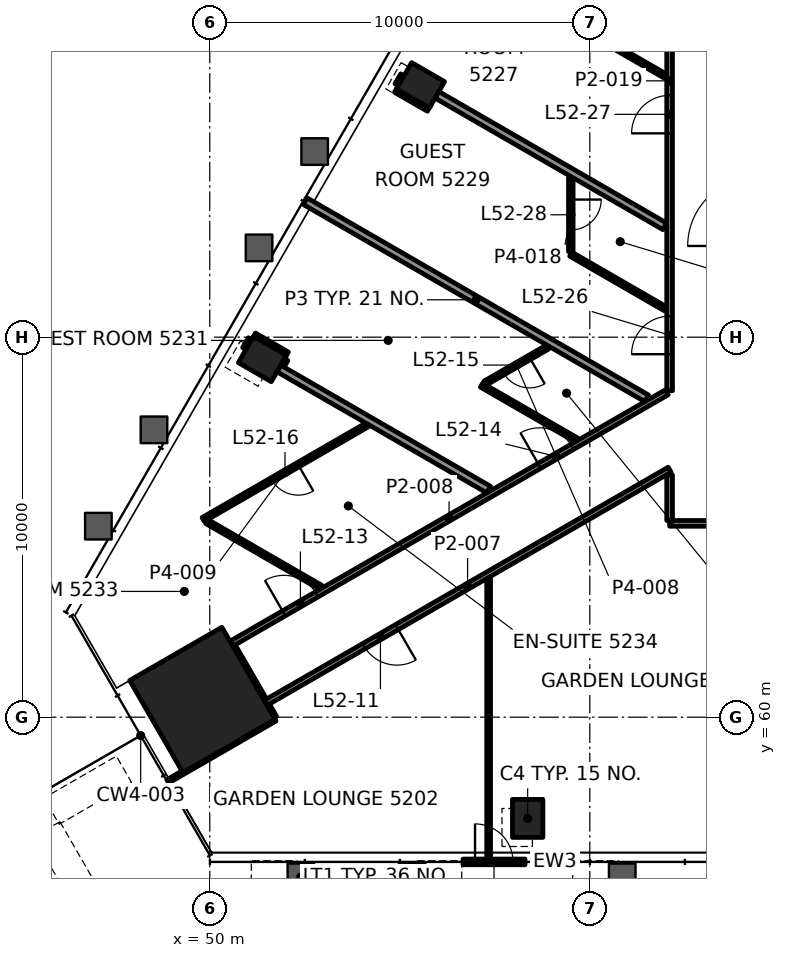
"""IFC4 building model, lengths in metres.
Left out: names, types, materials, properties, quantities, classifications, styles, units other than length and angle.
Written with IfcOpenShell. Run it as: python <this file> out.ifc"""

import sys

from ifc_helpers import new_model, si_unit, direction, frame, frame_2d, origin, origin_2d, place, context, subcontext, project, spatial, rectangle, hollow_rectangle, extrude, element, fill, save


model = new_model("IFC4")
c1 = context("Model", 3, precision=1e-05, world=origin(), true_north=direction((0.0, 1.0)))
c2 = subcontext(c1, "Body", "Model", "MODEL_VIEW")
j1 = project(units=[si_unit("LENGTHUNIT", "METRE"), si_unit("PLANEANGLEUNIT", "RADIAN")], contexts=[c1])
p1 = place(None, origin())
s1 = spatial("IfcSite", under=j1, at=p1, CompositionType="ELEMENT")
p2 = place(p1, origin())
s2 = spatial("IfcBuilding", under=s1, at=p2, CompositionType="ELEMENT")
p3 = place(p2, frame((0.0, 0.0, 222.1)))
s3 = spatial("IfcBuildingStorey", under=s2, at=p3, CompositionType="ELEMENT", Elevation=222.1)
p4 = place(p3, frame((49.806, 60.454, 0.0), z_axis=(0.0, 0.0, 1.0), x_axis=(0.5, -0.866025403784, 0.0)))
e1 = element("IfcColumn", 1, at=p4, inside=s3, PredefinedType="COLUMN", context=c2, shape_type="SweptSolid", body=[
    extrude(rectangle(XDim=2.8, YDim=2.8, at=origin_2d()), origin(), (0.0, 0.0, 1.0), 3.9),
])
for number, where, z_axis, x_axis in (
    (2, (58.365, 57.337, -0.0), (0.0, 0.0, 1.0), (1.0, 0.0, 0.0)),
    (3, (55.544, 76.628, -0.0), (0.0, 0.0, 1.0), (-0.5, -0.866, 0.0)),
    (4, (51.385, 69.425, -0.0), (0.0, 0.0, 1.0), (-0.5, -0.866, 0.0)),
):
    element("IfcColumn", number, at=place(p3, frame(where, z_axis=z_axis, x_axis=x_axis)), inside=s3, PredefinedType="COLUMN", context=c2, shape_type="SweptSolid", body=[
        extrude(hollow_rectangle(XDim=0.8, YDim=1.0, WallThickness=0.05, at=origin_2d()), origin(), (0.0, 0.0, 1.0), 3.9),
    ])
p5 = place(p3, frame((87.899, 65.1, 0.0), z_axis=(0.0, 0.0, 1.0), x_axis=(-1.0, 0.0, 0.0)))
e5 = element("IfcWall", 5, at=p5, inside=s3, PredefinedType="PARTITIONING", context=c2, shape_type="SweptSolid", body=[
    extrude(rectangle(XDim=25.799, YDim=0.15, at=frame_2d((12.899, 0.0))), origin(), (0.0, 0.0, 1.0), 3.1),
])
p6 = place(p5, frame((1.636, 0.0, 0.0)))
e6 = element("IfcOpeningElement", 6, at=p6, cuts=e5, PredefinedType="OPENING", context=c2, shape_type="SweptSolid", body=[
    extrude(rectangle(XDim=1.0, YDim=2.1, at=frame_2d((0.5, 1.05))), frame((0.0, 0.085, 0.0), z_axis=(0.0, -1.0, 0.0), x_axis=(1.0, 0.0, 0.0)), (0.0, 0.0, 1.0), 0.17),
])
p7 = place(p5, frame((7.984, 0.0, 0.0)))
e7 = element("IfcOpeningElement", 7, at=p7, cuts=e5, PredefinedType="OPENING", context=c2, shape_type="SweptSolid", body=[
    extrude(rectangle(XDim=1.0, YDim=2.1, at=frame_2d((0.5, 1.05))), frame((0.0, 0.085, 0.0), z_axis=(0.0, -1.0, 0.0), x_axis=(1.0, 0.0, 0.0)), (0.0, 0.0, 1.0), 0.17),
])
p8 = place(p5, frame((16.815, 0.0, 0.0)))
e8 = element("IfcOpeningElement", 8, at=p8, cuts=e5, PredefinedType="OPENING", context=c2, shape_type="SweptSolid", body=[
    extrude(rectangle(XDim=1.0, YDim=2.1, at=frame_2d((0.5, 1.05))), frame((0.0, 0.085, 0.0), z_axis=(0.0, -1.0, 0.0), x_axis=(1.0, 0.0, 0.0)), (0.0, 0.0, 1.0), 0.17),
])
p9 = place(p5, frame((23.163, 0.0, 0.0)))
e9 = element("IfcOpeningElement", 9, at=p9, cuts=e5, PredefinedType="OPENING", context=c2, shape_type="SweptSolid", body=[
    extrude(rectangle(XDim=1.0, YDim=2.1, at=frame_2d((0.5, 1.05))), frame((0.0, 0.085, 0.0), z_axis=(0.0, -1.0, 0.0), x_axis=(1.0, 0.0, 0.0)), (0.0, 0.0, 1.0), 0.17),
])
p10 = place(p3, frame((48.895, 58.312, 0.0), z_axis=(0.0, 0.0, 1.0), x_axis=(0.866035906198, 0.499981808845, 0.0)))
e10 = element("IfcWall", 10, at=p10, inside=s3, PredefinedType="PARTITIONING", context=c2, shape_type="SweptSolid", body=[
    extrude(rectangle(XDim=3.259, YDim=0.1, at=frame_2d((1.63, 0.0))), origin(), (0.0, 0.0, 1.0), 3.1),
])
p11 = place(p3, frame((62.1, 66.513, 0.0), z_axis=(0.0, 0.0, 1.0), x_axis=(-0.866027942666, -0.499995602502, 0.0)))
e11 = element("IfcWall", 11, at=p11, inside=s3, PredefinedType="PARTITIONING", context=c2, shape_type="SweptSolid", body=[
    extrude(rectangle(XDim=12.276, YDim=0.15, at=frame_2d((6.138, 0.0))), origin(), (0.0, 0.0, 1.0), 2.947),
])
p12 = place(p11, frame((8.286, 0.0, 0.0)))
e12 = element("IfcOpeningElement", 12, at=p12, cuts=e11, PredefinedType="OPENING", context=c2, shape_type="SweptSolid", body=[
    extrude(rectangle(XDim=1.0, YDim=2.1, at=frame_2d((0.5, 1.05))), frame((0.0, 0.085, 0.0), z_axis=(0.0, -1.0, 0.0), x_axis=(1.0, 0.0, 0.0)), (0.0, 0.0, 1.0), 0.17),
])
p13 = place(p3, frame((50.569, 61.934, 0.0), z_axis=(0.0, 0.0, 1.0), x_axis=(0.866030071145, 0.499991915808, 0.0)))
e13 = element("IfcWall", 13, at=p13, inside=s3, PredefinedType="PARTITIONING", context=c2, shape_type="SweptSolid", body=[
    extrude(rectangle(XDim=13.228, YDim=0.15, at=frame_2d((6.614, 0.0))), origin(), (0.0, 0.0, 1.0), 3.1),
])
p14 = place(p13, frame((1.597, 0.0, 0.0)))
e14 = element("IfcOpeningElement", 14, at=p14, cuts=e13, PredefinedType="OPENING", context=c2, shape_type="SweptSolid", body=[
    extrude(rectangle(XDim=1.0, YDim=2.1, at=frame_2d((0.5, 1.05))), frame((0.0, 0.085, 0.0), z_axis=(0.0, -1.0, 0.0), x_axis=(1.0, 0.0, 0.0)), (0.0, 0.0, 1.0), 0.17),
])
p15 = place(p13, frame((9.36, 0.0, 0.0)))
e15 = element("IfcOpeningElement", 15, at=p15, cuts=e13, PredefinedType="OPENING", context=c2, shape_type="SweptSolid", body=[
    extrude(rectangle(XDim=1.0, YDim=2.1, at=frame_2d((0.5, 1.05))), frame((0.0, 0.085, 0.0), z_axis=(0.0, -1.0, 0.0), x_axis=(1.0, 0.0, 0.0)), (0.0, 0.0, 1.0), 0.17),
])
p16 = place(p3, frame((58.889, 69.74, 0.0), z_axis=(0.0, 0.0, 1.0), x_axis=(-0.866039783157, -0.499975093369, 0.0)))
e16 = element("IfcWall", 16, at=p16, inside=s3, PredefinedType="PARTITIONING", context=c2, shape_type="SweptSolid", body=[
    extrude(rectangle(XDim=1.896, YDim=0.12, at=frame_2d((0.948, 0.0))), origin(), (0.0, 0.0, 1.0), 3.1),
])
p17 = place(p16, frame((0.548, 0.0, 0.0)))
e17 = element("IfcOpeningElement", 17, at=p17, cuts=e16, PredefinedType="OPENING", context=c2, shape_type="SweptSolid", body=[
    extrude(rectangle(XDim=0.8, YDim=2.1, at=frame_2d((0.4, 1.05))), frame((0.0, 0.07, 0.0), z_axis=(0.0, -1.0, 0.0), x_axis=(1.0, 0.0, 0.0)), (0.0, 0.0, 1.0), 0.14),
])
p18 = place(p3, frame((54.13, 67.685, 0.0), z_axis=(0.0, 0.0, 1.0), x_axis=(-0.866020232408, -0.500008956979, 0.0)))
e18 = element("IfcWall", 18, at=p18, inside=s3, PredefinedType="PARTITIONING", context=c2, shape_type="SweptSolid", body=[
    extrude(rectangle(XDim=4.967, YDim=0.12, at=frame_2d((2.483, 0.0))), origin(), (0.0, 0.0, 1.0), 3.1),
])
p19 = place(p18, frame((2.083, 0.0, 0.0)))
e19 = element("IfcOpeningElement", 19, at=p19, cuts=e18, PredefinedType="OPENING", context=c2, shape_type="SweptSolid", body=[
    extrude(rectangle(XDim=0.8, YDim=2.1, at=frame_2d((0.4, 1.05))), frame((0.0, 0.07, 0.0), z_axis=(0.0, -1.0, 0.0), x_axis=(1.0, 0.0, 0.0)), (0.0, 0.0, 1.0), 0.14),
])
p20 = place(p3, frame((51.868, 69.262, 0.0), z_axis=(0.0, 0.0, 1.0), x_axis=(0.500359323436, 0.865817848887, 0.0)))
e20 = element("IfcWall", 20, at=p20, inside=s3, PredefinedType="PARTITIONING", context=c2, shape_type="SweptSolid", body=[
    extrude(rectangle(XDim=0.199, YDim=0.2, at=frame_2d((0.1, 0.0))), origin(), (0.0, 0.0, 1.0), 3.1),
])
p21 = place(p3, frame((50.952, 69.676, 0.0), z_axis=(0.0, 0.0, 1.0), x_axis=(0.500264001326, 0.865872928886, 0.0)))
e21 = element("IfcWall", 21, at=p21, inside=s3, PredefinedType="PARTITIONING", context=c2, shape_type="SweptSolid", body=[
    extrude(rectangle(XDim=0.299, YDim=0.2, at=frame_2d((0.149, 0.0))), origin(), (0.0, 0.0, 1.0), 3.1),
])
p22 = place(p3, frame((54.961, 76.619, 0.0), z_axis=(0.0, 0.0, 1.0), x_axis=(0.500426713919, 0.865778900179, 0.0)))
e22 = element("IfcWall", 22, at=p22, inside=s3, PredefinedType="PARTITIONING", context=c2, shape_type="SweptSolid", body=[
    extrude(rectangle(XDim=0.3, YDim=0.2, at=frame_2d((0.15, 0.0))), origin(), (0.0, 0.0, 1.0), 3.1),
])
p23 = place(p3, frame((62.1, 65.176, 0.0), z_axis=(0.0, 0.0, 1.0), x_axis=(0.0, 1.0, 0.0)))
e23 = element("IfcWall", 23, at=p23, inside=s3, PredefinedType="PARTITIONING", context=c2, shape_type="SweptSolid", body=[
    extrude(rectangle(XDim=1.201, YDim=0.15, at=frame_2d((0.6, 0.0))), origin(), (0.0, 0.0, 1.0), 2.947),
])
p24 = place(p3, frame((62.1, 68.591, 0.0), z_axis=(0.0, 0.0, 1.0), x_axis=(0.0, 1.0, 0.0)))
e24 = element("IfcWall", 24, at=p24, inside=s3, PredefinedType="PARTITIONING", context=c2, shape_type="SweptSolid", body=[
    extrude(rectangle(XDim=16.308, YDim=0.15, at=frame_2d((8.154, 0.0))), origin(), (0.0, 0.0, 1.0), 3.1),
])
p25 = place(p24, frame((0.96, 0.0, 0.0)))
e25 = element("IfcOpeningElement", 25, at=p25, cuts=e24, PredefinedType="OPENING", context=c2, shape_type="SweptSolid", body=[
    extrude(rectangle(XDim=1.0, YDim=2.1, at=frame_2d((0.5, 1.05))), frame((0.0, 0.085, 0.0), z_axis=(0.0, -1.0, 0.0), x_axis=(1.0, 0.0, 0.0)), (0.0, 0.0, 1.0), 0.17),
])
p26 = place(p24, frame((6.772, 0.0, 0.0)))
e26 = element("IfcOpeningElement", 26, at=p26, cuts=e24, PredefinedType="OPENING", context=c2, shape_type="SweptSolid", body=[
    extrude(rectangle(XDim=1.0, YDim=2.1, at=frame_2d((0.5, 1.05))), frame((0.0, 0.085, 0.0), z_axis=(0.0, -1.0, 0.0), x_axis=(1.0, 0.0, 0.0)), (0.0, 0.0, 1.0), 0.17),
])
p27 = place(p3, frame((59.5, 74.189, 0.0), z_axis=(0.0, 0.0, 1.0), x_axis=(0.0, -1.0, 0.0)))
e27 = element("IfcWall", 27, at=p27, inside=s3, PredefinedType="PARTITIONING", context=c2, shape_type="SweptSolid", body=[
    extrude(rectangle(XDim=1.936, YDim=0.12, at=frame_2d((0.968, 0.0))), origin(), (0.0, 0.0, 1.0), 3.1),
])
p28 = place(p27, frame((0.568, 0.0, 0.0)))
e28 = element("IfcOpeningElement", 28, at=p28, cuts=e27, PredefinedType="OPENING", context=c2, shape_type="SweptSolid", body=[
    extrude(rectangle(XDim=0.8, YDim=2.1, at=frame_2d((0.4, 1.05))), frame((0.0, 0.07, 0.0), z_axis=(0.0, -1.0, 0.0), x_axis=(1.0, 0.0, 0.0)), (0.0, 0.0, 1.0), 0.14),
])
p29 = place(p3, frame((57.338, 56.312, 0.0), z_axis=(0.0, 0.0, 1.0), x_axis=(0.0, 1.0, 0.0)))
e29 = element("IfcWall", 29, at=p29, inside=s3, PredefinedType="PARTITIONING", context=c2, shape_type="SweptSolid", body=[
    extrude(rectangle(XDim=7.335, YDim=0.1, at=frame_2d((3.668, 0.0))), origin(), (0.0, 0.0, 1.0), 3.1),
])
p30 = place(p3, frame((51.693, 59.985, 0.0), z_axis=(0.0, 0.0, 1.0), x_axis=(-0.499854089722, 0.866109628736, 0.0)))
e30 = element("IfcWall", 30, at=p30, inside=s3, PredefinedType="PARTITIONING", context=c2, shape_type="SweptSolid", body=[
    extrude(rectangle(XDim=0.375, YDim=0.15, at=frame_2d((0.187, 0.0))), origin(), (0.0, 0.0, 1.0), 3.1),
])
p31 = place(p3, frame((61.99, 76.868, 0.0), z_axis=(0.0, 0.0, 1.0), x_axis=(-0.866028357664, 0.499994883695, 0.0)))
e31 = element("IfcWall", 31, at=p31, inside=s3, PredefinedType="PARTITIONING", context=c2, shape_type="SweptSolid", body=[
    extrude(rectangle(XDim=3.568, YDim=0.12, at=frame_2d((1.784, 0.0))), origin(), (0.0, 0.0, 1.0), 3.1),
])
p32 = place(p3, frame((61.973, 72.917, 0.0), z_axis=(0.0, 0.0, 1.0), x_axis=(-0.866027621823, 0.499996158224, 0.0)))
e32 = element("IfcWall", 32, at=p32, inside=s3, PredefinedType="PARTITIONING", context=c2, shape_type="SweptSolid", body=[
    extrude(rectangle(XDim=6.923, YDim=0.2, at=frame_2d((3.462, 0.0))), origin(), (0.0, 0.0, 1.0), 3.1),
])
p33 = place(p3, frame((55.777, 76.032, 0.0), z_axis=(0.0, 0.0, 1.0), x_axis=(-0.866010750942, 0.50002537861, 0.0)))
e33 = element("IfcWall", 33, at=p33, inside=s3, PredefinedType="PARTITIONING", context=c2, shape_type="SweptSolid", body=[
    extrude(rectangle(XDim=1.0, YDim=0.2, at=frame_2d((0.5, 0.0))), origin(), (0.0, 0.0, 1.0), 3.022),
])
p34 = place(p3, frame((61.99, 70.746, 0.0), z_axis=(0.0, 0.0, 1.0), x_axis=(-0.86600886466, 0.50002864551, 0.0)))
e34 = element("IfcWall", 34, at=p34, inside=s3, PredefinedType="PARTITIONING", context=c2, shape_type="SweptSolid", body=[
    extrude(rectangle(XDim=2.876, YDim=0.12, at=frame_2d((1.438, 0.0))), origin(), (0.0, 0.0, 1.0), 3.1),
])
p35 = place(p3, frame((61.497, 68.39, 0.0), z_axis=(0.0, 0.0, 1.0), x_axis=(-0.866030396021, 0.499991353094, 0.0)))
e35 = element("IfcWall", 35, at=p35, inside=s3, PredefinedType="PARTITIONING", context=c2, shape_type="SweptSolid", body=[
    extrude(rectangle(XDim=10.374, YDim=0.2, at=frame_2d((5.187, 0.0))), origin(), (0.0, 0.0, 1.0), 3.022),
])
p36 = place(p3, frame((59.643, 67.299, 0.0), z_axis=(0.0, 0.0, 1.0), x_axis=(-0.86600886466, 0.50002864551, 0.0)))
e36 = element("IfcWall", 36, at=p36, inside=s3, PredefinedType="PARTITIONING", context=c2, shape_type="SweptSolid", body=[
    extrude(rectangle(XDim=2.876, YDim=0.12, at=frame_2d((1.438, 0.0))), origin(), (0.0, 0.0, 1.0), 3.1),
])
p37 = place(p3, frame((52.018, 69.522, 0.0), z_axis=(0.0, 0.0, 1.0), x_axis=(-0.86597798544, 0.50008212199, 0.0)))
e37 = element("IfcWall", 37, at=p37, inside=s3, PredefinedType="PARTITIONING", context=c2, shape_type="SweptSolid", body=[
    extrude(rectangle(XDim=0.999, YDim=0.2, at=frame_2d((0.5, 0.0))), origin(), (0.0, 0.0, 1.0), 3.022),
])
p38 = place(p3, frame((57.338, 65.989, 0.0), z_axis=(0.0, 0.0, 1.0), x_axis=(-0.866008861407, 0.500028651143, 0.0)))
e38 = element("IfcWall", 38, at=p38, inside=s3, PredefinedType="PARTITIONING", context=c2, shape_type="SweptSolid", body=[
    extrude(rectangle(XDim=6.373, YDim=0.2, at=frame_2d((3.187, 0.0))), origin(), (0.0, 0.0, 1.0), 3.1),
])
p39 = place(p3, frame((52.919, 63.418, 0.0), z_axis=(0.0, 0.0, 1.0), x_axis=(-0.866045730533, 0.499964791386, 0.0)))
e39 = element("IfcWall", 39, at=p39, inside=s3, PredefinedType="PARTITIONING", context=c2, shape_type="SweptSolid", body=[
    extrude(rectangle(XDim=3.459, YDim=0.12, at=frame_2d((1.729, 0.0))), origin(), (0.0, 0.0, 1.0), 3.1),
])
p40 = place(p3, frame((51.431, 60.44, 0.0), z_axis=(0.0, 0.0, 1.0), x_axis=(-0.499991515992, 0.866030301974, 0.0)))
e40 = element("IfcWall", 40, at=p40, inside=s3, PredefinedType="PARTITIONING", context=c2, shape_type="SweptSolid", body=[
    extrude(rectangle(XDim=1.649, YDim=0.15, at=frame_2d((0.825, 0.0))), origin(), (0.0, 0.0, 1.0), 2.947),
])
p41 = place(p3, frame((47.743, 58.628, 0.0), z_axis=(0.0, 0.0, 1.0), x_axis=(-0.86605622881, -0.499946605688, 0.0)))
e41 = element("IfcWall", 41, at=p41, inside=s3, PredefinedType="SOLIDWALL", context=c2, shape_type="SweptSolid", body=[
    extrude(rectangle(XDim=2.2, YDim=0.8, at=frame_2d((1.1, 0.0))), origin(), (0.0, 0.0, 1.0), 0.9),
])
p42 = place(p3, frame((45.709, 57.05, 0.0), z_axis=(0.0, 0.0, 1.0), x_axis=(0.49999844609, -0.866026300933, 0.0)))
e42 = element("IfcWall", 42, at=p42, inside=s3, PredefinedType="SOLIDWALL", context=c2, shape_type="SweptSolid", body=[
    extrude(rectangle(XDim=4.109, YDim=0.8, at=frame_2d((2.055, 0.0))), origin(), (0.0, 0.0, 1.0), 0.9),
])
p43 = place(p12, origin())
e43 = element("IfcDoor", 43, at=p43, inside=s3, OperationType="SINGLE_SWING_RIGHT", PredefinedType="DOOR", context=c2, shape_type="SweptSolid", body=[
    extrude(rectangle(XDim=1.0, YDim=2.1, at=frame_2d((0.5, 1.05))), frame((0.0, 0.025, 0.0), z_axis=(0.0, -1.0, 0.0), x_axis=(1.0, 0.0, 0.0)), (0.0, 0.0, 1.0), 0.05),
])
fill(e12, e43)
p44 = place(p14, origin())
e44 = element("IfcDoor", 44, at=p44, inside=s3, OperationType="SINGLE_SWING_RIGHT", PredefinedType="DOOR", context=c2, shape_type="SweptSolid", body=[
    extrude(rectangle(XDim=1.0, YDim=2.1, at=frame_2d((0.5, 1.05))), frame((0.0, 0.025, 0.0), z_axis=(0.0, -1.0, 0.0), x_axis=(1.0, 0.0, 0.0)), (0.0, 0.0, 1.0), 0.05),
])
fill(e14, e44)
p45 = place(p15, origin())
e45 = element("IfcDoor", 45, at=p45, inside=s3, OperationType="SINGLE_SWING_RIGHT", PredefinedType="DOOR", context=c2, shape_type="SweptSolid", body=[
    extrude(rectangle(XDim=1.0, YDim=2.1, at=frame_2d((0.5, 1.05))), frame((0.0, 0.025, 0.0), z_axis=(0.0, -1.0, 0.0), x_axis=(1.0, 0.0, 0.0)), (0.0, 0.0, 1.0), 0.05),
])
fill(e15, e45)
p46 = place(p17, origin())
e46 = element("IfcDoor", 46, at=p46, inside=s3, OperationType="SINGLE_SWING_RIGHT", PredefinedType="DOOR", context=c2, shape_type="SweptSolid", body=[
    extrude(rectangle(XDim=0.8, YDim=2.1, at=frame_2d((0.4, 1.05))), frame((0.0, 0.025, 0.0), z_axis=(0.0, -1.0, 0.0), x_axis=(1.0, 0.0, 0.0)), (0.0, 0.0, 1.0), 0.05),
])
fill(e17, e46)
p47 = place(p19, origin())
e47 = element("IfcDoor", 47, at=p47, inside=s3, OperationType="SINGLE_SWING_RIGHT", PredefinedType="DOOR", context=c2, shape_type="SweptSolid", body=[
    extrude(rectangle(XDim=0.8, YDim=2.1, at=frame_2d((0.4, 1.05))), frame((0.0, 0.025, 0.0), z_axis=(0.0, -1.0, 0.0), x_axis=(1.0, 0.0, 0.0)), (0.0, 0.0, 1.0), 0.05),
])
fill(e19, e47)
p48 = place(p25, origin())
e48 = element("IfcDoor", 48, at=p48, inside=s3, OperationType="SINGLE_SWING_RIGHT", PredefinedType="DOOR", context=c2, shape_type="SweptSolid", body=[
    extrude(rectangle(XDim=1.0, YDim=2.1, at=frame_2d((0.5, 1.05))), frame((0.0, 0.025, 0.0), z_axis=(0.0, -1.0, 0.0), x_axis=(1.0, 0.0, 0.0)), (0.0, 0.0, 1.0), 0.05),
])
fill(e25, e48)
p49 = place(p26, origin())
e49 = element("IfcDoor", 49, at=p49, inside=s3, OperationType="SINGLE_SWING_RIGHT", PredefinedType="DOOR", context=c2, shape_type="SweptSolid", body=[
    extrude(rectangle(XDim=1.0, YDim=2.1, at=frame_2d((0.5, 1.05))), frame((0.0, 0.025, 0.0), z_axis=(0.0, -1.0, 0.0), x_axis=(1.0, 0.0, 0.0)), (0.0, 0.0, 1.0), 0.05),
])
fill(e26, e49)
p50 = place(p28, origin())
e50 = element("IfcDoor", 50, at=p50, inside=s3, OperationType="SINGLE_SWING_RIGHT", PredefinedType="DOOR", context=c2, shape_type="SweptSolid", body=[
    extrude(rectangle(XDim=0.8, YDim=2.1, at=frame_2d((0.4, 1.05))), frame((0.0, 0.025, 0.0), z_axis=(0.0, -1.0, 0.0), x_axis=(1.0, 0.0, 0.0)), (0.0, 0.0, 1.0), 0.05),
])
fill(e28, e50)
p51 = place(p3, frame((56.664, 56.192, 0.0), z_axis=(0.0, 0.0, 1.0), x_axis=(1.0, 0.0, 0.0)))
p52 = place(p51, frame((0.316, 0.0, 0.0)))
p53 = place(p52, origin())
e51 = element("IfcDoor", 51, at=p53, inside=s3, OperationType="SINGLE_SWING_LEFT", PredefinedType="DOOR", context=c2, shape_type="SweptSolid", body=[
    extrude(rectangle(XDim=1.0, YDim=2.1, at=frame_2d((0.5, 1.05))), frame((0.0, 0.025, 0.0), z_axis=(0.0, -1.0, 0.0), x_axis=(1.0, 0.0, 0.0)), (0.0, 0.0, 1.0), 0.05),
])
save(model, sys.argv[1])
